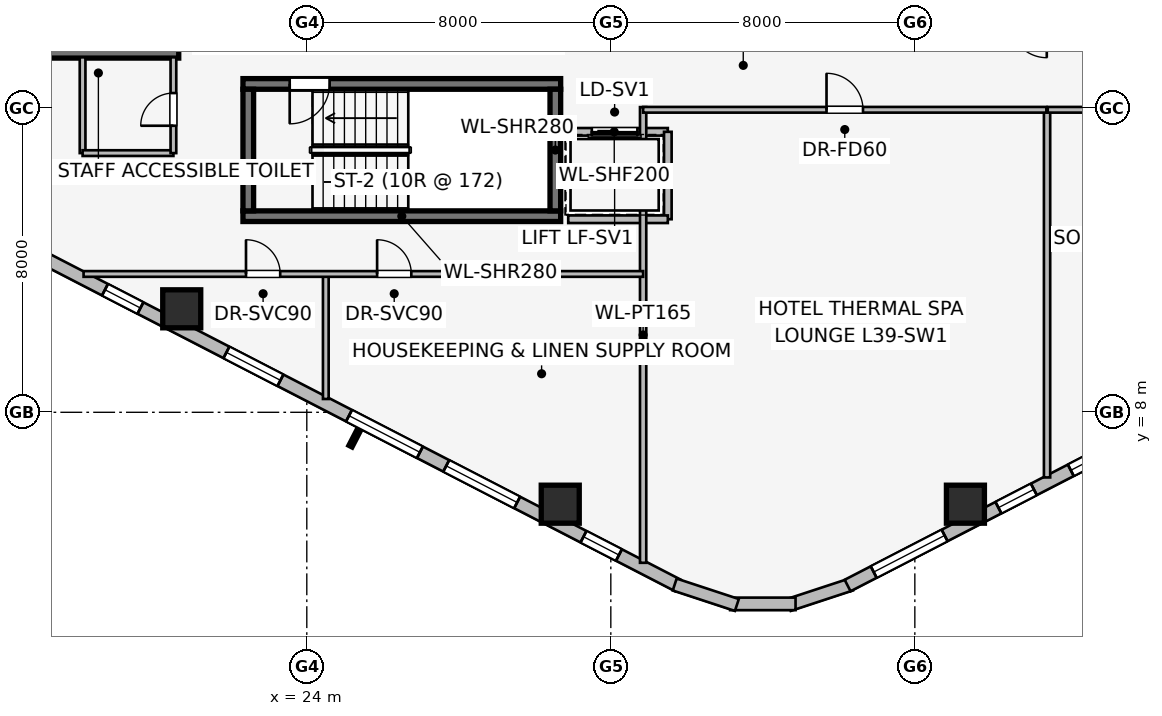
"""IFC4 building model, lengths in metres.
Left out: names, types, materials, properties, quantities, classifications, styles, units other than length and angle.
Written with IfcOpenShell. Run it as: python <this file> out.ifc"""

import sys

from ifc_helpers import new_model, si_unit, direction, frame, frame_2d, origin, origin_2d, place, context, subcontext, project, spatial, rectangle, extrude, element, fill, save


model = new_model("IFC4")
c1 = context("Model", 3, precision=1e-05, world=origin(), true_north=direction((0.0, 1.0)))
c2 = subcontext(c1, "Body", "Model", "MODEL_VIEW")
j1 = project(units=[si_unit("LENGTHUNIT", "METRE"), si_unit("PLANEANGLEUNIT", "RADIAN")], contexts=[c1])
p1 = place(None, origin())
s1 = spatial("IfcSite", under=j1, at=p1, CompositionType="ELEMENT")
p2 = place(p1, origin())
s2 = spatial("IfcBuilding", under=s1, at=p2, CompositionType="ELEMENT")
p3 = place(p2, frame((0.0, 0.0, 146.4)))
s3 = spatial("IfcBuildingStorey", under=s2, at=p3, CompositionType="ELEMENT", Elevation=146.4)
p4 = place(p3, frame((16.87, 17.46, 0.0), z_axis=(0.0, 0.0, 1.0), x_axis=(1.0, 0.0, 0.0)))
e1 = element("IfcWall", 1, at=p4, inside=s3, PredefinedType="SHEAR", context=c2, shape_type="SweptSolid", body=[
    extrude(rectangle(XDim=3.76, YDim=0.28, at=frame_2d((1.88, 0.0))), origin(), (0.0, 0.0, 1.0), 3.45),
])
p5 = place(p3, frame((22.32, 13.16, 0.0), z_axis=(0.0, 0.0, 1.0), x_axis=(1.0, 0.0, 0.0)))
e2 = element("IfcWall", 2, at=p5, inside=s3, PredefinedType="SHEAR", context=c2, shape_type="SweptSolid", body=[
    extrude(rectangle(XDim=8.36, YDim=0.28, at=frame_2d((4.18, 0.0))), origin(), (0.0, 0.0, 1.0), 3.45),
])
p6 = place(p3, frame((30.68, 16.64, 0.0), z_axis=(0.0, 0.0, 1.0), x_axis=(-1.0, 0.0, 0.0)))
e3 = element("IfcWall", 3, at=p6, inside=s3, PredefinedType="SHEAR", context=c2, shape_type="SweptSolid", body=[
    extrude(rectangle(XDim=8.36, YDim=0.28, at=frame_2d((4.18, 0.0))), origin(), (0.0, 0.0, 1.0), 3.45),
])
p7 = place(p6, frame((6.08, 0.0, 0.0)))
e4 = element("IfcOpeningElement", 4, at=p7, cuts=e3, PredefinedType="OPENING", context=c2, shape_type="SweptSolid", body=[
    extrude(rectangle(XDim=1.05, YDim=2.0, at=frame_2d((0.525, 1.0))), frame((0.0, 0.15, 0.0), z_axis=(0.0, -1.0, 0.0), x_axis=(1.0, 0.0, 0.0)), (0.0, 0.0, 1.0), 0.3),
])
for number, where, z_axis, x_axis in (
    (5, (22.46, 16.5, 0.0), (0.0, 0.0, 1.0), (0.0, -1.0, 0.0)),
    (6, (30.54, 13.3, 0.0), (0.0, 0.0, 1.0), (0.0, 1.0, 0.0)),
):
    element("IfcWall", number, at=place(p3, frame(where, z_axis=z_axis, x_axis=x_axis)), inside=s3, PredefinedType="SHEAR", context=c2, shape_type="SweptSolid", body=[
        extrude(rectangle(XDim=3.2, YDim=0.28, at=frame_2d((1.6, 0.0))), origin(), (0.0, 0.0, 1.0), 3.45),
    ])
for number, where, z_axis, x_axis in (
    (7, (20.709, 10.723, 0.0), (0.0, 0.0, 1.0), (1.0, 0.0, 0.0)),
    (8, (30.669, 5.582, 0.0), (0.0, 0.0, 1.0), (1.0, 0.0, 0.0)),
    (9, (41.331, 5.582, 0.0), (0.0, 0.0, 1.0), (1.0, 0.0, 0.0)),
):
    element("IfcColumn", number, at=place(p3, frame(where, z_axis=z_axis, x_axis=x_axis)), inside=s3, PredefinedType="COLUMN", context=c2, shape_type="SweptSolid", body=[
        extrude(rectangle(XDim=1.0, YDim=1.0, at=origin_2d()), origin(), (0.0, 0.0, 1.0), 3.45),
    ])
p8 = place(p3, frame((17.243, 11.95, 0.0), z_axis=(0.0, 0.0, 1.0), x_axis=(-0.790621329885, 0.612305408053, 0.0)))
e10 = element("IfcWall", 10, at=p8, inside=s3, PredefinedType="STANDARD", context=c2, shape_type="SweptSolid", body=[
    extrude(rectangle(XDim=1.676, YDim=0.33, at=frame_2d((0.838, 0.0))), origin(), (0.0, 0.0, 1.0), 3.19),
])
p9 = place(p3, frame((33.769, 3.442, 0.0), z_axis=(0.0, 0.0, 1.0), x_axis=(-0.888613612362, 0.458656568606, 0.0)))
e11 = element("IfcWall", 11, at=p9, inside=s3, PredefinedType="STANDARD", context=c2, shape_type="SweptSolid", body=[
    extrude(rectangle(XDim=18.681, YDim=0.34, at=frame_2d((9.34, 0.0))), origin(), (0.0, 0.0, 1.0), 3.19),
])
p10 = place(p9, frame((1.75, 0.0, 0.75)))
e12 = element("IfcOpeningElement", 12, at=p10, cuts=e11, PredefinedType="OPENING", context=c2, shape_type="SweptSolid", body=[
    extrude(rectangle(XDim=1.05, YDim=1.4, at=frame_2d((0.525, 0.7))), frame((0.0, 0.18, 0.0), z_axis=(0.0, -1.0, 0.0), x_axis=(1.0, 0.0, 0.0)), (0.0, 0.0, 1.0), 0.36),
])
p11 = place(p9, frame((4.765, 0.0, 0.75)))
e13 = element("IfcOpeningElement", 13, at=p11, cuts=e11, PredefinedType="OPENING", context=c2, shape_type="SweptSolid", body=[
    extrude(rectangle(XDim=2.1, YDim=1.5, at=frame_2d((1.05, 0.75))), frame((0.0, 0.18, 0.0), z_axis=(0.0, -1.0, 0.0), x_axis=(1.0, 0.0, 0.0)), (0.0, 0.0, 1.0), 0.36),
])
p12 = place(p9, frame((7.644, 0.0, 0.75)))
e14 = element("IfcOpeningElement", 14, at=p12, cuts=e11, PredefinedType="OPENING", context=c2, shape_type="SweptSolid", body=[
    extrude(rectangle(XDim=2.1, YDim=1.5, at=frame_2d((1.05, 0.75))), frame((0.0, 0.18, 0.0), z_axis=(0.0, -1.0, 0.0), x_axis=(1.0, 0.0, 0.0)), (0.0, 0.0, 1.0), 0.36),
])
p13 = place(p9, frame((11.774, 0.0, 0.75)))
e15 = element("IfcOpeningElement", 15, at=p13, cuts=e11, PredefinedType="OPENING", context=c2, shape_type="SweptSolid", body=[
    extrude(rectangle(XDim=1.6, YDim=1.55, at=frame_2d((0.8, 0.775))), frame((0.0, 0.18, 0.0), z_axis=(0.0, -1.0, 0.0), x_axis=(1.0, 0.0, 0.0)), (0.0, 0.0, 1.0), 0.36),
])
p14 = place(p9, frame((15.92, 0.0, 0.75)))
e16 = element("IfcOpeningElement", 16, at=p14, cuts=e11, PredefinedType="OPENING", context=c2, shape_type="SweptSolid", body=[
    extrude(rectangle(XDim=1.05, YDim=1.4, at=frame_2d((0.525, 0.7))), frame((0.0, 0.18, 0.0), z_axis=(0.0, -1.0, 0.0), x_axis=(1.0, 0.0, 0.0)), (0.0, 0.0, 1.0), 0.36),
])
for number, where, z_axis, x_axis in (
    (17, (38.319, 3.468, 0.0), (0.0, 0.0, 1.0), (-0.95, -0.312, 0.0)),
    (18, (36.861, 2.959, 0.0), (0.0, 0.0, 1.0), (-1.0, 0.0, 0.0)),
    (19, (35.317, 2.93, 0.0), (0.0, 0.0, 1.0), (-0.95, 0.312, 0.0)),
):
    element("IfcWall", number, at=place(p3, frame(where, z_axis=z_axis, x_axis=x_axis)), inside=s3, PredefinedType="STANDARD", context=c2, shape_type="SweptSolid", body=[
        extrude(rectangle(XDim=1.722, YDim=0.33, at=frame_2d((0.861, 0.0))), origin(), (0.0, 0.0, 1.0), 3.19),
    ])
p15 = place(p3, frame((54.831, 12.01, 0.0), z_axis=(0.0, 0.0, 1.0), x_axis=(-0.888613612362, -0.458656568606, 0.0)))
e20 = element("IfcWall", 20, at=p15, inside=s3, PredefinedType="STANDARD", context=c2, shape_type="SweptSolid", body=[
    extrude(rectangle(XDim=18.681, YDim=0.34, at=frame_2d((9.34, 0.0))), origin(), (0.0, 0.0, 1.0), 3.19),
])
p16 = place(p15, frame((1.023, 0.0, 0.75)))
e21 = element("IfcOpeningElement", 21, at=p16, cuts=e20, PredefinedType="OPENING", context=c2, shape_type="SweptSolid", body=[
    extrude(rectangle(XDim=1.6, YDim=1.55, at=frame_2d((0.8, 0.775))), frame((0.0, 0.18, 0.0), z_axis=(0.0, -1.0, 0.0), x_axis=(1.0, 0.0, 0.0)), (0.0, 0.0, 1.0), 0.36),
])
p17 = place(p15, frame((4.655, 0.0, 0.75)))
e22 = element("IfcOpeningElement", 22, at=p17, cuts=e20, PredefinedType="OPENING", context=c2, shape_type="SweptSolid", body=[
    extrude(rectangle(XDim=2.1, YDim=1.5, at=frame_2d((1.05, 0.75))), frame((0.0, 0.18, 0.0), z_axis=(0.0, -1.0, 0.0), x_axis=(1.0, 0.0, 0.0)), (0.0, 0.0, 1.0), 0.36),
])
p18 = place(p15, frame((7.313, 0.0, 0.75)))
e23 = element("IfcOpeningElement", 23, at=p18, cuts=e20, PredefinedType="OPENING", context=c2, shape_type="SweptSolid", body=[
    extrude(rectangle(XDim=2.1, YDim=1.5, at=frame_2d((1.05, 0.75))), frame((0.0, 0.18, 0.0), z_axis=(0.0, -1.0, 0.0), x_axis=(1.0, 0.0, 0.0)), (0.0, 0.0, 1.0), 0.36),
])
p19 = place(p15, frame((9.971, 0.0, 0.75)))
e24 = element("IfcOpeningElement", 24, at=p19, cuts=e20, PredefinedType="OPENING", context=c2, shape_type="SweptSolid", body=[
    extrude(rectangle(XDim=2.1, YDim=1.5, at=frame_2d((1.05, 0.75))), frame((0.0, 0.18, 0.0), z_axis=(0.0, -1.0, 0.0), x_axis=(1.0, 0.0, 0.0)), (0.0, 0.0, 1.0), 0.36),
])
p20 = place(p15, frame((13.165, 0.0, 0.75)))
e25 = element("IfcOpeningElement", 25, at=p20, cuts=e20, PredefinedType="OPENING", context=c2, shape_type="SweptSolid", body=[
    extrude(rectangle(XDim=1.05, YDim=1.4, at=frame_2d((0.525, 0.7))), frame((0.0, 0.18, 0.0), z_axis=(0.0, -1.0, 0.0), x_axis=(1.0, 0.0, 0.0)), (0.0, 0.0, 1.0), 0.36),
])
p21 = place(p15, frame((15.808, 0.0, 0.75)))
e26 = element("IfcOpeningElement", 26, at=p21, cuts=e20, PredefinedType="OPENING", context=c2, shape_type="SweptSolid", body=[
    extrude(rectangle(XDim=2.1, YDim=1.5, at=frame_2d((1.05, 0.75))), frame((0.0, 0.18, 0.0), z_axis=(0.0, -1.0, 0.0), x_axis=(1.0, 0.0, 0.0)), (0.0, 0.0, 1.0), 0.36),
])
p22 = place(p3, frame((33.5, 15.38, 0.0), z_axis=(0.0, 0.0, 1.0), x_axis=(-1.0, 0.0, 0.0)))
e27 = element("IfcWall", 27, at=p22, inside=s3, PredefinedType="PARTITIONING", context=c2, shape_type="SweptSolid", body=[
    extrude(rectangle(XDim=2.82, YDim=0.2, at=frame_2d((1.41, 0.0))), origin(), (0.0, 0.0, 1.0), 3.19),
])
p23 = place(p22, frame((0.8, 0.0, 0.0)))
e28 = element("IfcOpeningElement", 28, at=p23, cuts=e27, PredefinedType="OPENING", context=c2, shape_type="SweptSolid", body=[
    extrude(rectangle(XDim=1.2, YDim=2.2, at=frame_2d((0.6, 1.1))), frame((0.0, 0.11, 0.0), z_axis=(0.0, -1.0, 0.0), x_axis=(1.0, 0.0, 0.0)), (0.0, 0.0, 1.0), 0.22),
])
p24 = place(p3, frame((33.5, 13.08, 0.0), z_axis=(0.0, 0.0, 1.0), x_axis=(0.0, 1.0, 0.0)))
e29 = element("IfcWall", 29, at=p24, inside=s3, PredefinedType="PARTITIONING", context=c2, shape_type="SweptSolid", body=[
    extrude(rectangle(XDim=2.3, YDim=0.2, at=frame_2d((1.15, 0.0))), origin(), (0.0, 0.0, 1.0), 3.19),
])
p25 = place(p3, frame((30.879, 13.08, 0.0), z_axis=(0.0, 0.0, 1.0), x_axis=(1.0, 0.0, 0.0)))
e30 = element("IfcWall", 30, at=p25, inside=s3, PredefinedType="PARTITIONING", context=c2, shape_type="SweptSolid", body=[
    extrude(rectangle(XDim=2.621, YDim=0.2, at=frame_2d((1.311, 0.0))), origin(), (0.0, 0.0, 1.0), 3.19),
])
p26 = place(p3, frame((18.1, 17.34, 0.0), z_axis=(0.0, 0.0, 1.0), x_axis=(0.0, -1.0, 0.0)))
e31 = element("IfcWall", 31, at=p26, inside=s3, PredefinedType="PARTITIONING", context=c2, shape_type="SweptSolid", body=[
    extrude(rectangle(XDim=2.52, YDim=0.15, at=frame_2d((1.26, 0.0))), origin(), (0.0, 0.0, 1.0), 3.19),
])
p27 = place(p3, frame((18.1, 14.82, 0.0), z_axis=(0.0, 0.0, 1.0), x_axis=(1.0, 0.0, 0.0)))
e32 = element("IfcWall", 32, at=p27, inside=s3, PredefinedType="PARTITIONING", context=c2, shape_type="SweptSolid", body=[
    extrude(rectangle(XDim=2.39, YDim=0.15, at=frame_2d((1.195, 0.0))), origin(), (0.0, 0.0, 1.0), 3.19),
])
p28 = place(p3, frame((20.49, 14.82, 0.0), z_axis=(0.0, 0.0, 1.0), x_axis=(0.0, 1.0, 0.0)))
e33 = element("IfcWall", 33, at=p28, inside=s3, PredefinedType="PARTITIONING", context=c2, shape_type="SweptSolid", body=[
    extrude(rectangle(XDim=2.52, YDim=0.15, at=frame_2d((1.26, 0.0))), origin(), (0.0, 0.0, 1.0), 3.19),
])
p29 = place(p28, frame((0.72, 0.0, 0.0)))
e34 = element("IfcOpeningElement", 34, at=p29, cuts=e33, PredefinedType="OPENING", context=c2, shape_type="SweptSolid", body=[
    extrude(rectangle(XDim=0.86, YDim=2.0, at=frame_2d((0.43, 1.0))), frame((0.0, 0.085, 0.0), z_axis=(0.0, -1.0, 0.0), x_axis=(1.0, 0.0, 0.0)), (0.0, 0.0, 1.0), 0.17),
])
p30 = place(p3, frame((32.85, 4.04, 0.0), z_axis=(0.0, 0.0, 1.0), x_axis=(0.0, 1.0, 0.0)))
e35 = element("IfcWall", 35, at=p30, inside=s3, PredefinedType="PARTITIONING", context=c2, shape_type="SweptSolid", body=[
    extrude(rectangle(XDim=11.99, YDim=0.165, at=frame_2d((5.995, 0.0))), origin(), (0.0, 0.0, 1.0), 3.19),
])
p31 = place(p3, frame((24.5, 8.35, 0.0), z_axis=(0.0, 0.0, 1.0), x_axis=(0.0, 1.0, 0.0)))
e36 = element("IfcWall", 36, at=p31, inside=s3, PredefinedType="PARTITIONING", context=c2, shape_type="SweptSolid", body=[
    extrude(rectangle(XDim=3.29, YDim=0.15, at=frame_2d((1.645, 0.0))), origin(), (0.0, 0.0, 1.0), 3.19),
])
p32 = place(p3, frame((18.126, 11.64, 0.0), z_axis=(0.0, 0.0, 1.0), x_axis=(1.0, 0.0, 0.0)))
e37 = element("IfcWall", 37, at=p32, inside=s3, PredefinedType="PARTITIONING", context=c2, shape_type="SweptSolid", body=[
    extrude(rectangle(XDim=14.724, YDim=0.15, at=frame_2d((7.362, 0.0))), origin(), (0.0, 0.0, 1.0), 3.19),
])
p33 = place(p32, frame((4.274, 0.0, 0.0)))
e38 = element("IfcOpeningElement", 38, at=p33, cuts=e37, PredefinedType="OPENING", context=c2, shape_type="SweptSolid", body=[
    extrude(rectangle(XDim=0.9, YDim=2.0, at=frame_2d((0.45, 1.0))), frame((0.0, 0.085, 0.0), z_axis=(0.0, -1.0, 0.0), x_axis=(1.0, 0.0, 0.0)), (0.0, 0.0, 1.0), 0.17),
])
p34 = place(p32, frame((7.724, 0.0, 0.0)))
e39 = element("IfcOpeningElement", 39, at=p34, cuts=e37, PredefinedType="OPENING", context=c2, shape_type="SweptSolid", body=[
    extrude(rectangle(XDim=0.9, YDim=2.0, at=frame_2d((0.45, 1.0))), frame((0.0, 0.085, 0.0), z_axis=(0.0, -1.0, 0.0), x_axis=(1.0, 0.0, 0.0)), (0.0, 0.0, 1.0), 0.17),
])
p35 = place(p3, frame((43.479, 6.286, 0.0), z_axis=(0.0, 0.0, 1.0), x_axis=(0.0, 1.0, 0.0)))
e40 = element("IfcWall", 40, at=p35, inside=s3, PredefinedType="PARTITIONING", context=c2, shape_type="SweptSolid", body=[
    extrude(rectangle(XDim=9.644, YDim=0.165, at=frame_2d((4.822, 0.0))), origin(), (0.0, 0.0, 1.0), 3.19),
])
p36 = place(p3, frame((32.85, 15.96, 0.0), z_axis=(0.0, 0.0, 1.0), x_axis=(1.0, 0.0, 0.0)))
e41 = element("IfcWall", 41, at=p36, inside=s3, PredefinedType="PARTITIONING", context=c2, shape_type="SweptSolid", body=[
    extrude(rectangle(XDim=10.611, YDim=0.15, at=frame_2d((5.305, 0.0))), origin(), (0.0, 0.0, 1.0), 3.19),
])
p37 = place(p36, frame((4.826, 0.0, 0.0)))
e42 = element("IfcOpeningElement", 42, at=p37, cuts=e41, PredefinedType="OPENING", context=c2, shape_type="SweptSolid", body=[
    extrude(rectangle(XDim=0.96, YDim=2.0, at=frame_2d((0.48, 1.0))), frame((0.0, 0.085, 0.0), z_axis=(0.0, -1.0, 0.0), x_axis=(1.0, 0.0, 0.0)), (0.0, 0.0, 1.0), 0.17),
])
p38 = place(p3, frame((43.497, 15.96, 0.0), z_axis=(0.0, 0.0, 1.0), x_axis=(1.0, 0.0, 0.0)))
e43 = element("IfcWall", 43, at=p38, inside=s3, PredefinedType="PARTITIONING", context=c2, shape_type="SweptSolid", body=[
    extrude(rectangle(XDim=13.711, YDim=0.15, at=frame_2d((6.855, 0.0))), origin(), (0.0, 0.0, 1.0), 3.19),
])
p39 = place(p38, frame((6.389, 0.0, 0.0)))
e44 = element("IfcOpeningElement", 44, at=p39, cuts=e43, PredefinedType="OPENING", context=c2, shape_type="SweptSolid", body=[
    extrude(rectangle(XDim=0.96, YDim=2.0, at=frame_2d((0.48, 1.0))), frame((0.0, 0.085, 0.0), z_axis=(0.0, -1.0, 0.0), x_axis=(1.0, 0.0, 0.0)), (0.0, 0.0, 1.0), 0.17),
])
p40 = place(p10, origin())
e45 = element("IfcWindow", 45, at=p40, inside=s3, PartitioningType="SINGLE_PANEL", PredefinedType="WINDOW", context=c2, shape_type="SweptSolid", body=[
    extrude(rectangle(XDim=1.05, YDim=1.4, at=frame_2d((0.525, 0.7))), frame((0.0, 0.03, 0.0), z_axis=(0.0, -1.0, 0.0), x_axis=(1.0, 0.0, 0.0)), (0.0, 0.0, 1.0), 0.06),
])
fill(e12, e45)
p41 = place(p11, origin())
e46 = element("IfcWindow", 46, at=p41, inside=s3, PartitioningType="SINGLE_PANEL", PredefinedType="WINDOW", context=c2, shape_type="SweptSolid", body=[
    extrude(rectangle(XDim=2.1, YDim=1.5, at=frame_2d((1.05, 0.75))), frame((0.0, 0.03, 0.0), z_axis=(0.0, -1.0, 0.0), x_axis=(1.0, 0.0, 0.0)), (0.0, 0.0, 1.0), 0.06),
])
fill(e13, e46)
p42 = place(p12, origin())
e47 = element("IfcWindow", 47, at=p42, inside=s3, PartitioningType="SINGLE_PANEL", PredefinedType="WINDOW", context=c2, shape_type="SweptSolid", body=[
    extrude(rectangle(XDim=2.1, YDim=1.5, at=frame_2d((1.05, 0.75))), frame((0.0, 0.03, 0.0), z_axis=(0.0, -1.0, 0.0), x_axis=(1.0, 0.0, 0.0)), (0.0, 0.0, 1.0), 0.06),
])
fill(e14, e47)
p43 = place(p13, origin())
e48 = element("IfcWindow", 48, at=p43, inside=s3, PartitioningType="SINGLE_PANEL", PredefinedType="WINDOW", context=c2, shape_type="SweptSolid", body=[
    extrude(rectangle(XDim=1.6, YDim=1.55, at=frame_2d((0.8, 0.775))), frame((0.0, 0.03, 0.0), z_axis=(0.0, -1.0, 0.0), x_axis=(1.0, 0.0, 0.0)), (0.0, 0.0, 1.0), 0.06),
])
fill(e15, e48)
p44 = place(p14, origin())
e49 = element("IfcWindow", 49, at=p44, inside=s3, PartitioningType="SINGLE_PANEL", PredefinedType="WINDOW", context=c2, shape_type="SweptSolid", body=[
    extrude(rectangle(XDim=1.05, YDim=1.4, at=frame_2d((0.525, 0.7))), frame((0.0, 0.03, 0.0), z_axis=(0.0, -1.0, 0.0), x_axis=(1.0, 0.0, 0.0)), (0.0, 0.0, 1.0), 0.06),
])
fill(e16, e49)
p45 = place(p19, origin())
e50 = element("IfcWindow", 50, at=p45, inside=s3, PartitioningType="SINGLE_PANEL", PredefinedType="WINDOW", context=c2, shape_type="SweptSolid", body=[
    extrude(rectangle(XDim=2.1, YDim=1.5, at=frame_2d((1.05, 0.75))), frame((0.0, 0.03, 0.0), z_axis=(0.0, -1.0, 0.0), x_axis=(1.0, 0.0, 0.0)), (0.0, 0.0, 1.0), 0.06),
])
fill(e24, e50)
p46 = place(p20, origin())
e51 = element("IfcWindow", 51, at=p46, inside=s3, PartitioningType="SINGLE_PANEL", PredefinedType="WINDOW", context=c2, shape_type="SweptSolid", body=[
    extrude(rectangle(XDim=1.05, YDim=1.4, at=frame_2d((0.525, 0.7))), frame((0.0, 0.03, 0.0), z_axis=(0.0, -1.0, 0.0), x_axis=(1.0, 0.0, 0.0)), (0.0, 0.0, 1.0), 0.06),
])
fill(e25, e51)
p47 = place(p21, origin())
e52 = element("IfcWindow", 52, at=p47, inside=s3, PartitioningType="SINGLE_PANEL", PredefinedType="WINDOW", context=c2, shape_type="SweptSolid", body=[
    extrude(rectangle(XDim=2.1, YDim=1.5, at=frame_2d((1.05, 0.75))), frame((0.0, 0.03, 0.0), z_axis=(0.0, -1.0, 0.0), x_axis=(1.0, 0.0, 0.0)), (0.0, 0.0, 1.0), 0.06),
])
fill(e26, e52)
p48 = place(p7, origin())
e53 = element("IfcDoor", 53, at=p48, inside=s3, OperationType="SINGLE_SWING_RIGHT", PredefinedType="DOOR", context=c2, shape_type="SweptSolid", body=[
    extrude(rectangle(XDim=1.05, YDim=2.0, at=frame_2d((0.525, 1.0))), frame((0.0, 0.025, 0.0), z_axis=(0.0, -1.0, 0.0), x_axis=(1.0, 0.0, 0.0)), (0.0, 0.0, 1.0), 0.05),
])
fill(e4, e53)
p49 = place(p23, origin())
e54 = element("IfcDoor", 54, at=p49, inside=s3, OperationType="SLIDING_TO_RIGHT", PredefinedType="DOOR", context=c2, shape_type="SweptSolid", body=[
    extrude(rectangle(XDim=1.2, YDim=2.2, at=frame_2d((0.6, 1.1))), frame((0.0, 0.025, 0.0), z_axis=(0.0, -1.0, 0.0), x_axis=(1.0, 0.0, 0.0)), (0.0, 0.0, 1.0), 0.05),
])
fill(e28, e54)
p50 = place(p29, origin())
e55 = element("IfcDoor", 55, at=p50, inside=s3, OperationType="SINGLE_SWING_LEFT", PredefinedType="DOOR", context=c2, shape_type="SweptSolid", body=[
    extrude(rectangle(XDim=0.86, YDim=2.0, at=frame_2d((0.43, 1.0))), frame((0.0, 0.025, 0.0), z_axis=(0.0, -1.0, 0.0), x_axis=(1.0, 0.0, 0.0)), (0.0, 0.0, 1.0), 0.05),
])
fill(e34, e55)
p51 = place(p33, origin())
e56 = element("IfcDoor", 56, at=p51, inside=s3, OperationType="SINGLE_SWING_LEFT", PredefinedType="DOOR", context=c2, shape_type="SweptSolid", body=[
    extrude(rectangle(XDim=0.9, YDim=2.0, at=frame_2d((0.45, 1.0))), frame((0.0, 0.025, 0.0), z_axis=(0.0, -1.0, 0.0), x_axis=(1.0, 0.0, 0.0)), (0.0, 0.0, 1.0), 0.05),
])
fill(e38, e56)
p52 = place(p34, origin())
e57 = element("IfcDoor", 57, at=p52, inside=s3, OperationType="SINGLE_SWING_LEFT", PredefinedType="DOOR", context=c2, shape_type="SweptSolid", body=[
    extrude(rectangle(XDim=0.9, YDim=2.0, at=frame_2d((0.45, 1.0))), frame((0.0, 0.025, 0.0), z_axis=(0.0, -1.0, 0.0), x_axis=(1.0, 0.0, 0.0)), (0.0, 0.0, 1.0), 0.05),
])
fill(e39, e57)
p53 = place(p37, origin())
e58 = element("IfcDoor", 58, at=p53, inside=s3, OperationType="SINGLE_SWING_LEFT", PredefinedType="DOOR", context=c2, shape_type="SweptSolid", body=[
    extrude(rectangle(XDim=0.96, YDim=2.0, at=frame_2d((0.48, 1.0))), frame((0.0, 0.025, 0.0), z_axis=(0.0, -1.0, 0.0), x_axis=(1.0, 0.0, 0.0)), (0.0, 0.0, 1.0), 0.05),
])
fill(e42, e58)
save(model, sys.argv[1])
